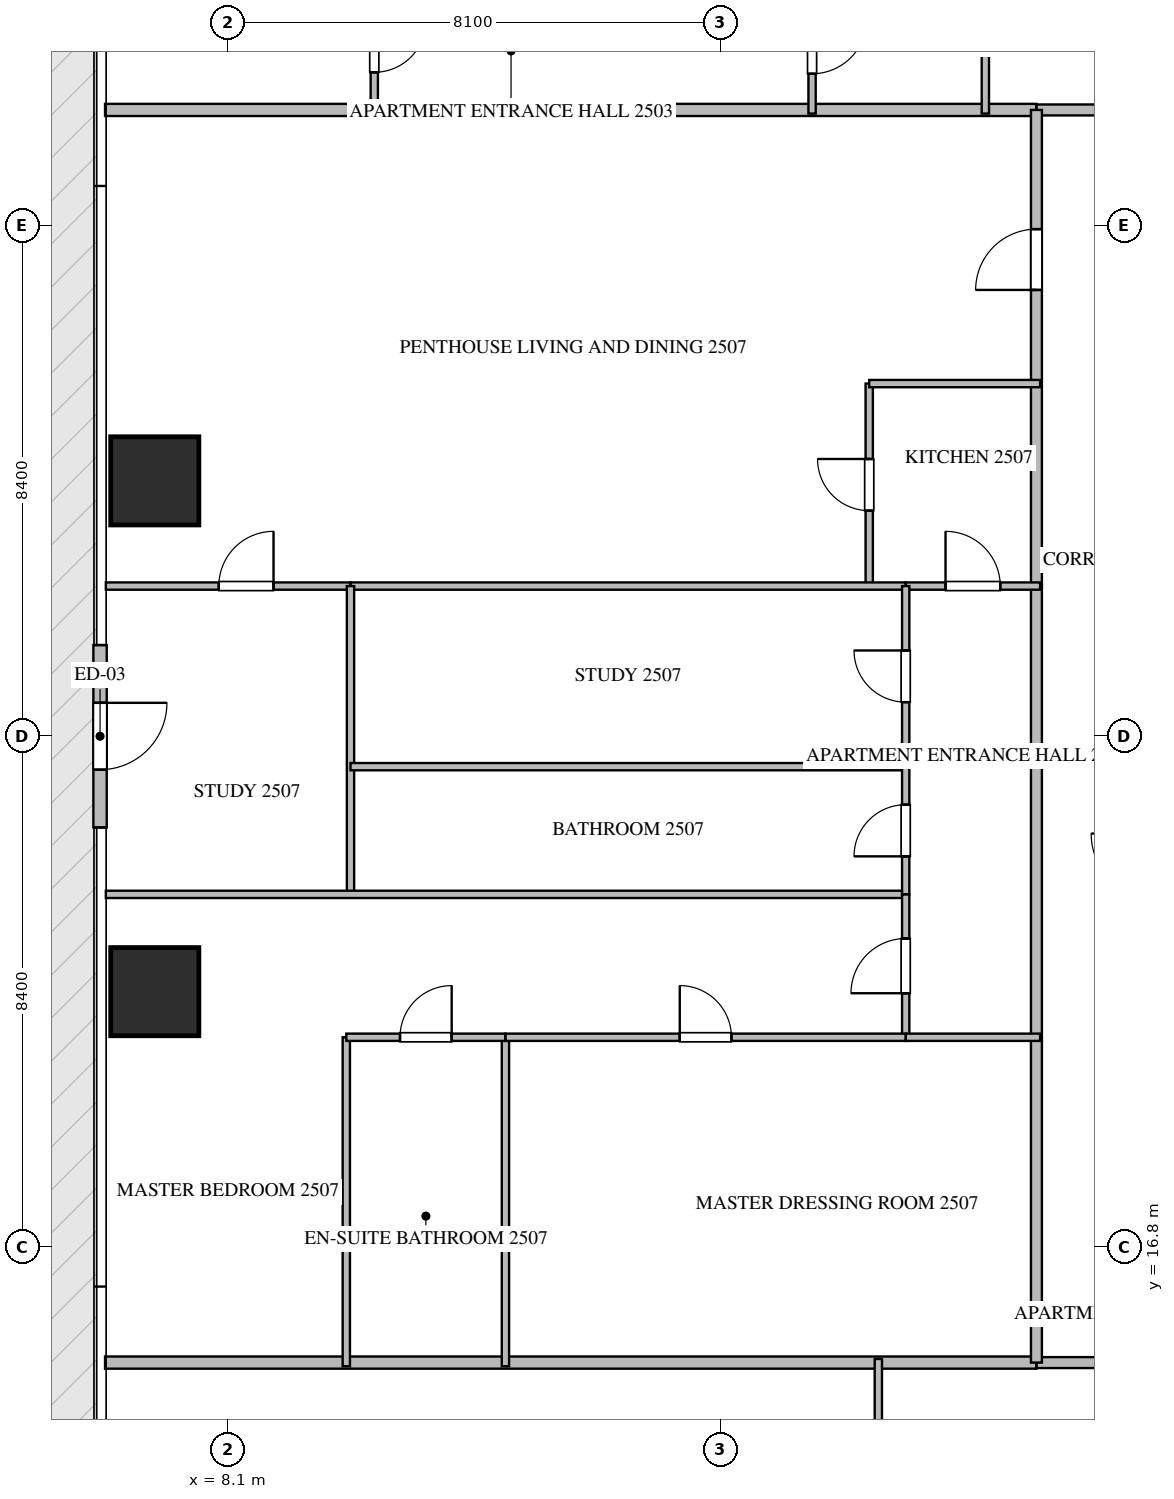
"""IFC4 building model, lengths in metres.
Left out: names, types, materials, properties, quantities, classifications, styles, units other than length and angle.
Written with IfcOpenShell. Run it as: python <this file> out.ifc"""

import sys

from ifc_helpers import new_model, si_unit, direction, frame, frame_2d, origin, origin_2d, place, context, subcontext, project, spatial, rectangle, extrude, source, transform, mapped, element, fill, save


model = new_model("IFC4")
c1 = context("Model", 3, precision=1e-05, world=origin(), true_north=direction((0.0, 1.0)))
c2 = subcontext(c1, "Body", "Model", "MODEL_VIEW")
j1 = project(units=[si_unit("LENGTHUNIT", "METRE"), si_unit("PLANEANGLEUNIT", "RADIAN")], contexts=[c1])
p1 = place(None, origin())
s1 = spatial("IfcSite", under=j1, at=p1, CompositionType="ELEMENT")
p2 = place(p1, origin())
s2 = spatial("IfcBuilding", under=s1, at=p2, CompositionType="ELEMENT")
p3 = place(p2, frame((0.0, 0.0, 101.7)))
s3 = spatial("IfcBuildingStorey", under=s2, at=p3, CompositionType="ELEMENT", Elevation=101.7)
m1 = source(origin(), c2, "Body", "SweptSolid", [
    extrude(rectangle(XDim=1.45, YDim=1.45, at=origin_2d()), origin(), (0.0, 0.0, 1.0), 3.75),
])
for number, where, z_axis, x_axis in (
    (1, (6.9, 21.0, -0.26), (0.0, 0.0, 1.0), (1.0, 0.0, 0.0)),
    (2, (6.9, 29.4, -0.26), (0.0, 0.0, 1.0), (1.0, 0.0, 0.0)),
):
    element("IfcColumn", number, at=place(p3, frame(where, z_axis=z_axis, x_axis=x_axis)), inside=s3, PredefinedType="COLUMN", context=c2, shape_type="MappedRepresentation", body=[
        mapped(m1, transform((0.0, 0.0, 0.0), scale=1.0)),
    ])
p4 = place(p3, frame((6.0, 26.7, 0.0), z_axis=(0.0, 0.0, 1.0), x_axis=(0.0, -1.0, 0.0)))
e3 = element("IfcWall", 3, at=p4, inside=s3, PredefinedType="ELEMENTEDWALL", context=c2, shape_type="SweptSolid", body=[
    extrude(rectangle(XDim=3.0, YDim=0.22, at=frame_2d((1.5, 0.0))), origin(), (0.0, 0.0, 1.0), 3.475),
])
p5 = place(p4, frame((0.95, 0.0, 0.0)))
e4 = element("IfcOpeningElement", 4, at=p5, cuts=e3, PredefinedType="OPENING", context=c2, shape_type="SweptSolid", body=[
    extrude(rectangle(XDim=1.1, YDim=2.2, at=frame_2d((0.55, 1.1))), frame((0.0, 0.12, 0.0), z_axis=(0.0, -1.0, 0.0), x_axis=(1.0, 0.0, 0.0)), (0.0, 0.0, 1.0), 0.24),
])
for number, where, z_axis, x_axis in (
    (5, (6.082, 14.9, 0.0), (0.0, 0.0, 1.0), (1.0, 0.0, 0.0)),
    (6, (6.082, 35.5, 0.0), (0.0, 0.0, 1.0), (1.0, 0.0, 0.0)),
):
    element("IfcWall", number, at=place(p3, frame(where, z_axis=z_axis, x_axis=x_axis)), inside=s3, PredefinedType="PARTITIONING", context=c2, shape_type="SweptSolid", body=[
        extrude(rectangle(XDim=15.318, YDim=0.2, at=frame_2d((7.659, 0.0))), origin(), (0.0, 0.0, 1.0), 3.49),
    ])
p6 = place(p3, frame((21.402, 14.9, 0.0), z_axis=(0.0, 0.0, 1.0), x_axis=(1.0, 0.0, 0.0)))
e7 = element("IfcWall", 7, at=p6, inside=s3, PredefinedType="PARTITIONING", context=c2, shape_type="SweptSolid", body=[
    extrude(rectangle(XDim=21.996, YDim=0.18, at=frame_2d((10.998, 0.0))), origin(), (0.0, 0.0, 1.0), 3.49),
])
p7 = place(p6, frame((10.351, 0.0, 0.0)))
e8 = element("IfcOpeningElement", 8, at=p7, cuts=e7, PredefinedType="OPENING", context=c2, shape_type="SweptSolid", body=[
    extrude(rectangle(XDim=1.0, YDim=2.15, at=frame_2d((0.5, 1.075))), frame((0.0, 0.1, 0.0), z_axis=(0.0, -1.0, 0.0), x_axis=(1.0, 0.0, 0.0)), (0.0, 0.0, 1.0), 0.2),
])
p8 = place(p6, frame((15.978, 0.0, 0.0)))
e9 = element("IfcOpeningElement", 9, at=p8, cuts=e7, PredefinedType="OPENING", context=c2, shape_type="SweptSolid", body=[
    extrude(rectangle(XDim=1.0, YDim=2.15, at=frame_2d((0.5, 1.075))), frame((0.0, 0.1, 0.0), z_axis=(0.0, -1.0, 0.0), x_axis=(1.0, 0.0, 0.0)), (0.0, 0.0, 1.0), 0.2),
])
p9 = place(p3, frame((21.402, 35.5, 0.0), z_axis=(0.0, 0.0, 1.0), x_axis=(1.0, 0.0, 0.0)))
e10 = element("IfcWall", 10, at=p9, inside=s3, PredefinedType="PARTITIONING", context=c2, shape_type="SweptSolid", body=[
    extrude(rectangle(XDim=21.996, YDim=0.18, at=frame_2d((10.998, 0.0))), origin(), (0.0, 0.0, 1.0), 3.49),
])
p10 = place(p9, frame((1.96, 0.0, 0.0)))
e11 = element("IfcOpeningElement", 11, at=p10, cuts=e10, PredefinedType="OPENING", context=c2, shape_type="SweptSolid", body=[
    extrude(rectangle(XDim=1.0, YDim=2.15, at=frame_2d((0.5, 1.075))), frame((0.0, 0.1, 0.0), z_axis=(0.0, -1.0, 0.0), x_axis=(1.0, 0.0, 0.0)), (0.0, 0.0, 1.0), 0.2),
])
p11 = place(p9, frame((5.249, 0.0, 0.0)))
e12 = element("IfcOpeningElement", 12, at=p11, cuts=e10, PredefinedType="OPENING", context=c2, shape_type="SweptSolid", body=[
    extrude(rectangle(XDim=1.0, YDim=2.15, at=frame_2d((0.5, 1.075))), frame((0.0, 0.1, 0.0), z_axis=(0.0, -1.0, 0.0), x_axis=(1.0, 0.0, 0.0)), (0.0, 0.0, 1.0), 0.2),
])
p12 = place(p9, frame((11.653, 0.0, 0.0)))
e13 = element("IfcOpeningElement", 13, at=p12, cuts=e10, PredefinedType="OPENING", context=c2, shape_type="SweptSolid", body=[
    extrude(rectangle(XDim=1.0, YDim=2.15, at=frame_2d((0.5, 1.075))), frame((0.0, 0.1, 0.0), z_axis=(0.0, -1.0, 0.0), x_axis=(1.0, 0.0, 0.0)), (0.0, 0.0, 1.0), 0.2),
])
p13 = place(p9, frame((18.896, 0.0, 0.0)))
e14 = element("IfcOpeningElement", 14, at=p13, cuts=e10, PredefinedType="OPENING", context=c2, shape_type="SweptSolid", body=[
    extrude(rectangle(XDim=1.0, YDim=2.15, at=frame_2d((0.5, 1.075))), frame((0.0, 0.1, 0.0), z_axis=(0.0, -1.0, 0.0), x_axis=(1.0, 0.0, 0.0)), (0.0, 0.0, 1.0), 0.2),
])
p14 = place(p3, frame((21.4, 14.9, 0.0), z_axis=(0.0, 0.0, 1.0), x_axis=(0.0, 1.0, 0.0)))
e15 = element("IfcWall", 15, at=p14, inside=s3, PredefinedType="PARTITIONING", context=c2, shape_type="SweptSolid", body=[
    extrude(rectangle(XDim=20.6, YDim=0.18, at=frame_2d((10.3, 0.0))), origin(), (0.0, 0.0, 1.0), 3.49),
])
p15 = place(p14, frame((17.64, 0.0, 0.0)))
e16 = element("IfcOpeningElement", 16, at=p15, cuts=e15, PredefinedType="OPENING", context=c2, shape_type="SweptSolid", body=[
    extrude(rectangle(XDim=1.0, YDim=2.15, at=frame_2d((0.5, 1.075))), frame((0.0, 0.1, 0.0), z_axis=(0.0, -1.0, 0.0), x_axis=(1.0, 0.0, 0.0)), (0.0, 0.0, 1.0), 0.2),
])
p16 = place(p3, frame((18.8, 12.752, 0.0), z_axis=(0.0, 0.0, 1.0), x_axis=(0.0, 1.0, 0.0)))
e17 = element("IfcWall", 17, at=p16, inside=s3, PredefinedType="PARTITIONING", context=c2, shape_type="SweptSolid", body=[
    extrude(rectangle(XDim=2.208, YDim=0.12, at=frame_2d((1.104, 0.0))), origin(), (0.0, 0.0, 1.0), 3.49),
])
p17 = place(p3, frame((20.56, 38.25, 0.0), z_axis=(0.0, 0.0, 1.0), x_axis=(0.0, -1.0, 0.0)))
e18 = element("IfcWall", 18, at=p17, inside=s3, PredefinedType="PARTITIONING", context=c2, shape_type="SweptSolid", body=[
    extrude(rectangle(XDim=2.81, YDim=0.12, at=frame_2d((1.405, 0.0))), origin(), (0.0, 0.0, 1.0), 3.49),
])
p18 = place(p3, frame((17.71, 37.65, 0.0), z_axis=(0.0, 0.0, 1.0), x_axis=(0.0, -1.0, 0.0)))
e19 = element("IfcWall", 19, at=p18, inside=s3, PredefinedType="PARTITIONING", context=c2, shape_type="SweptSolid", body=[
    extrude(rectangle(XDim=2.21, YDim=0.12, at=frame_2d((1.105, 0.0))), origin(), (0.0, 0.0, 1.0), 3.49),
])
p19 = place(p18, frame((0.655, 0.0, 0.0)))
e20 = element("IfcOpeningElement", 20, at=p19, cuts=e19, PredefinedType="OPENING", context=c2, shape_type="SweptSolid", body=[
    extrude(rectangle(XDim=0.9, YDim=2.1, at=frame_2d((0.45, 1.05))), frame((0.0, 0.07, 0.0), z_axis=(0.0, -1.0, 0.0), x_axis=(1.0, 0.0, 0.0)), (0.0, 0.0, 1.0), 0.14),
])
p20 = place(p3, frame((10.51, 37.648, 0.0), z_axis=(0.0, 0.0, 1.0), x_axis=(0.0, -1.0, 0.0)))
e21 = element("IfcWall", 21, at=p20, inside=s3, PredefinedType="PARTITIONING", context=c2, shape_type="SweptSolid", body=[
    extrude(rectangle(XDim=2.208, YDim=0.12, at=frame_2d((1.104, 0.0))), origin(), (0.0, 0.0, 1.0), 3.49),
])
p21 = place(p20, frame((0.679, 0.0, 0.0)))
e22 = element("IfcOpeningElement", 22, at=p21, cuts=e21, PredefinedType="OPENING", context=c2, shape_type="SweptSolid", body=[
    extrude(rectangle(XDim=0.85, YDim=2.1, at=frame_2d((0.425, 1.05))), frame((0.0, 0.07, 0.0), z_axis=(0.0, -1.0, 0.0), x_axis=(1.0, 0.0, 0.0)), (0.0, 0.0, 1.0), 0.14),
])
p22 = place(p3, frame((18.65, 27.67, 0.0), z_axis=(0.0, 0.0, 1.0), x_axis=(0.0, 1.0, 0.0)))
e23 = element("IfcWall", 23, at=p22, inside=s3, PredefinedType="PARTITIONING", context=c2, shape_type="SweptSolid", body=[
    extrude(rectangle(XDim=3.33, YDim=0.12, at=frame_2d((1.665, 0.0))), origin(), (0.0, 0.0, 1.0), 3.49),
])
p23 = place(p22, frame((1.24, 0.0, 0.0)))
e24 = element("IfcOpeningElement", 24, at=p23, cuts=e23, PredefinedType="OPENING", context=c2, shape_type="SweptSolid", body=[
    extrude(rectangle(XDim=0.85, YDim=2.1, at=frame_2d((0.425, 1.05))), frame((0.0, 0.07, 0.0), z_axis=(0.0, -1.0, 0.0), x_axis=(1.0, 0.0, 0.0)), (0.0, 0.0, 1.0), 0.14),
])
p24 = place(p3, frame((18.65, 31.0, 0.0), z_axis=(0.0, 0.0, 1.0), x_axis=(1.0, 0.0, 0.0)))
e25 = element("IfcWall", 25, at=p24, inside=s3, PredefinedType="PARTITIONING", context=c2, shape_type="SweptSolid", body=[
    extrude(rectangle(XDim=2.81, YDim=0.12, at=frame_2d((1.405, 0.0))), origin(), (0.0, 0.0, 1.0), 3.49),
])
p25 = place(p3, frame((19.25, 27.67, 0.0), z_axis=(0.0, 0.0, 1.0), x_axis=(1.0, 0.0, 0.0)))
e26 = element("IfcWall", 26, at=p25, inside=s3, PredefinedType="PARTITIONING", context=c2, shape_type="SweptSolid", body=[
    extrude(rectangle(XDim=2.21, YDim=0.12, at=frame_2d((1.105, 0.0))), origin(), (0.0, 0.0, 1.0), 3.49),
])
p26 = place(p25, frame((0.655, 0.0, 0.0)))
e27 = element("IfcOpeningElement", 27, at=p26, cuts=e26, PredefinedType="OPENING", context=c2, shape_type="SweptSolid", body=[
    extrude(rectangle(XDim=0.9, YDim=2.1, at=frame_2d((0.45, 1.05))), frame((0.0, 0.07, 0.0), z_axis=(0.0, -1.0, 0.0), x_axis=(1.0, 0.0, 0.0)), (0.0, 0.0, 1.0), 0.14),
])
p27 = place(p3, frame((6.095, 27.67, 0.0), z_axis=(0.0, 0.0, 1.0), x_axis=(1.0, 0.0, 0.0)))
e28 = element("IfcWall", 28, at=p27, inside=s3, PredefinedType="PARTITIONING", context=c2, shape_type="SweptSolid", body=[
    extrude(rectangle(XDim=4.024, YDim=0.12, at=frame_2d((2.012, 0.0))), origin(), (0.0, 0.0, 1.0), 3.49),
])
p28 = place(p27, frame((1.858, 0.0, 0.0)))
e29 = element("IfcOpeningElement", 29, at=p28, cuts=e28, PredefinedType="OPENING", context=c2, shape_type="SweptSolid", body=[
    extrude(rectangle(XDim=0.9, YDim=2.1, at=frame_2d((0.45, 1.05))), frame((0.0, 0.07, 0.0), z_axis=(0.0, -1.0, 0.0), x_axis=(1.0, 0.0, 0.0)), (0.0, 0.0, 1.0), 0.14),
])
p29 = place(p3, frame((10.121, 27.67, 0.0), z_axis=(0.0, 0.0, 1.0), x_axis=(1.0, 0.0, 0.0)))
e30 = element("IfcWall", 30, at=p29, inside=s3, PredefinedType="PARTITIONING", context=c2, shape_type="SweptSolid", body=[
    extrude(rectangle(XDim=9.127, YDim=0.12, at=frame_2d((4.563, 0.0))), origin(), (0.0, 0.0, 1.0), 3.49),
])
p30 = place(p3, frame((10.119, 22.6, 0.0), z_axis=(0.0, 0.0, 1.0), x_axis=(0.0, 1.0, 0.0)))
e31 = element("IfcWall", 31, at=p30, inside=s3, PredefinedType="PARTITIONING", context=c2, shape_type="SweptSolid", body=[
    extrude(rectangle(XDim=5.07, YDim=0.12, at=frame_2d((2.535, 0.0))), origin(), (0.0, 0.0, 1.0), 3.49),
])
p31 = place(p3, frame((6.095, 22.6, 0.0), z_axis=(0.0, 0.0, 1.0), x_axis=(1.0, 0.0, 0.0)))
e32 = element("IfcWall", 32, at=p31, inside=s3, PredefinedType="PARTITIONING", context=c2, shape_type="SweptSolid", body=[
    extrude(rectangle(XDim=13.155, YDim=0.12, at=frame_2d((6.578, 0.0))), origin(), (0.0, 0.0, 1.0), 3.49),
])
p32 = place(p3, frame((10.119, 24.7, 0.0), z_axis=(0.0, 0.0, 1.0), x_axis=(1.0, 0.0, 0.0)))
e33 = element("IfcWall", 33, at=p32, inside=s3, PredefinedType="PARTITIONING", context=c2, shape_type="SweptSolid", body=[
    extrude(rectangle(XDim=9.131, YDim=0.12, at=frame_2d((4.565, 0.0))), origin(), (0.0, 0.0, 1.0), 3.49),
])
p33 = place(p3, frame((19.25, 22.6, 0.0), z_axis=(0.0, 0.0, 1.0), x_axis=(0.0, 1.0, 0.0)))
e34 = element("IfcWall", 34, at=p33, inside=s3, PredefinedType="PARTITIONING", context=c2, shape_type="SweptSolid", body=[
    extrude(rectangle(XDim=2.1, YDim=0.12, at=frame_2d((1.05, 0.0))), origin(), (0.0, 0.0, 1.0), 3.49),
])
p34 = place(p33, frame((0.625, 0.0, 0.0)))
e35 = element("IfcOpeningElement", 35, at=p34, cuts=e34, PredefinedType="OPENING", context=c2, shape_type="SweptSolid", body=[
    extrude(rectangle(XDim=0.85, YDim=2.1, at=frame_2d((0.425, 1.05))), frame((0.0, 0.07, 0.0), z_axis=(0.0, -1.0, 0.0), x_axis=(1.0, 0.0, 0.0)), (0.0, 0.0, 1.0), 0.14),
])
p35 = place(p3, frame((19.25, 24.702, 0.0), z_axis=(0.0, 0.0, 1.0), x_axis=(0.0, 1.0, 0.0)))
e36 = element("IfcWall", 36, at=p35, inside=s3, PredefinedType="PARTITIONING", context=c2, shape_type="SweptSolid", body=[
    extrude(rectangle(XDim=2.968, YDim=0.12, at=frame_2d((1.484, 0.0))), origin(), (0.0, 0.0, 1.0), 3.49),
])
p36 = place(p35, frame((1.059, 0.0, 0.0)))
e37 = element("IfcOpeningElement", 37, at=p36, cuts=e36, PredefinedType="OPENING", context=c2, shape_type="SweptSolid", body=[
    extrude(rectangle(XDim=0.85, YDim=2.1, at=frame_2d((0.425, 1.05))), frame((0.0, 0.07, 0.0), z_axis=(0.0, -1.0, 0.0), x_axis=(1.0, 0.0, 0.0)), (0.0, 0.0, 1.0), 0.14),
])
p37 = place(p3, frame((19.25, 20.25, 0.0), z_axis=(0.0, 0.0, 1.0), x_axis=(0.0, 1.0, 0.0)))
e38 = element("IfcWall", 38, at=p37, inside=s3, PredefinedType="PARTITIONING", context=c2, shape_type="SweptSolid", body=[
    extrude(rectangle(XDim=2.348, YDim=0.12, at=frame_2d((1.174, 0.0))), origin(), (0.0, 0.0, 1.0), 3.49),
])
p38 = place(p37, frame((0.724, 0.0, 0.0)))
e39 = element("IfcOpeningElement", 39, at=p38, cuts=e38, PredefinedType="OPENING", context=c2, shape_type="SweptSolid", body=[
    extrude(rectangle(XDim=0.9, YDim=2.1, at=frame_2d((0.45, 1.05))), frame((0.0, 0.07, 0.0), z_axis=(0.0, -1.0, 0.0), x_axis=(1.0, 0.0, 0.0)), (0.0, 0.0, 1.0), 0.14),
])
for number, where, z_axis, x_axis in (
    (40, (10.05, 14.84, 0.0), (0.0, 0.0, 1.0), (0.0, 1.0, 0.0)),
    (41, (12.667, 14.84, 0.0), (0.0, 0.0, 1.0), (0.0, 1.0, 0.0)),
):
    element("IfcWall", number, at=place(p3, frame(where, z_axis=z_axis, x_axis=x_axis)), inside=s3, PredefinedType="PARTITIONING", context=c2, shape_type="SweptSolid", body=[
        extrude(rectangle(XDim=5.41, YDim=0.12, at=frame_2d((2.705, 0.0))), origin(), (0.0, 0.0, 1.0), 3.49),
    ])
p39 = place(p3, frame((10.05, 20.25, 0.0), z_axis=(0.0, 0.0, 1.0), x_axis=(1.0, 0.0, 0.0)))
e42 = element("IfcWall", 42, at=p39, inside=s3, PredefinedType="PARTITIONING", context=c2, shape_type="SweptSolid", body=[
    extrude(rectangle(XDim=2.617, YDim=0.12, at=frame_2d((1.309, 0.0))), origin(), (0.0, 0.0, 1.0), 3.49),
])
p40 = place(p39, frame((0.883, 0.0, 0.0)))
e43 = element("IfcOpeningElement", 43, at=p40, cuts=e42, PredefinedType="OPENING", context=c2, shape_type="SweptSolid", body=[
    extrude(rectangle(XDim=0.85, YDim=2.1, at=frame_2d((0.425, 1.05))), frame((0.0, 0.07, 0.0), z_axis=(0.0, -1.0, 0.0), x_axis=(1.0, 0.0, 0.0)), (0.0, 0.0, 1.0), 0.14),
])
p41 = place(p3, frame((12.669, 20.25, 0.0), z_axis=(0.0, 0.0, 1.0), x_axis=(1.0, 0.0, 0.0)))
e44 = element("IfcWall", 44, at=p41, inside=s3, PredefinedType="PARTITIONING", context=c2, shape_type="SweptSolid", body=[
    extrude(rectangle(XDim=6.581, YDim=0.12, at=frame_2d((3.291, 0.0))), origin(), (0.0, 0.0, 1.0), 3.49),
])
p42 = place(p41, frame((2.865, 0.0, 0.0)))
e45 = element("IfcOpeningElement", 45, at=p42, cuts=e44, PredefinedType="OPENING", context=c2, shape_type="SweptSolid", body=[
    extrude(rectangle(XDim=0.85, YDim=2.1, at=frame_2d((0.425, 1.05))), frame((0.0, 0.07, 0.0), z_axis=(0.0, -1.0, 0.0), x_axis=(1.0, 0.0, 0.0)), (0.0, 0.0, 1.0), 0.14),
])
p43 = place(p3, frame((19.252, 20.25, 0.0), z_axis=(0.0, 0.0, 1.0), x_axis=(1.0, 0.0, 0.0)))
e46 = element("IfcWall", 46, at=p43, inside=s3, PredefinedType="PARTITIONING", context=c2, shape_type="SweptSolid", body=[
    extrude(rectangle(XDim=2.208, YDim=0.12, at=frame_2d((1.104, 0.0))), origin(), (0.0, 0.0, 1.0), 3.49),
])
m2 = source(origin(), c2, "Body", "SweptSolid", [
    extrude(rectangle(XDim=1.1, YDim=2.2, at=frame_2d((0.55, 1.1))), frame((0.0, 0.025, 0.0), z_axis=(0.0, -1.0, 0.0), x_axis=(1.0, 0.0, 0.0)), (0.0, 0.0, 1.0), 0.05),
])
p44 = place(p5, origin())
e47 = element("IfcDoor", 47, at=p44, inside=s3, OperationType="SINGLE_SWING_LEFT", PredefinedType="DOOR", context=c2, shape_type="MappedRepresentation", body=[
    mapped(m2, transform((0.0, 0.0, 0.0), scale=1.0)),
])
fill(e4, e47)
m3 = source(origin(), c2, "Body", "SweptSolid", [
    extrude(rectangle(XDim=1.0, YDim=2.15, at=frame_2d((0.5, 1.075))), frame((0.0, 0.025, 0.0), z_axis=(0.0, -1.0, 0.0), x_axis=(1.0, 0.0, 0.0)), (0.0, 0.0, 1.0), 0.05),
])
p45 = place(p15, origin())
e48 = element("IfcDoor", 48, at=p45, inside=s3, OperationType="SINGLE_SWING_LEFT", PredefinedType="DOOR", context=c2, shape_type="MappedRepresentation", body=[
    mapped(m3, transform((0.0, 0.0, 0.0), scale=1.0)),
])
fill(e16, e48)
m4 = source(origin(), c2, "Body", "SweptSolid", [
    extrude(rectangle(XDim=0.9, YDim=2.1, at=frame_2d((0.45, 1.05))), frame((0.0, 0.025, 0.0), z_axis=(0.0, -1.0, 0.0), x_axis=(1.0, 0.0, 0.0)), (0.0, 0.0, 1.0), 0.05),
])
p46 = place(p19, origin())
e49 = element("IfcDoor", 49, at=p46, inside=s3, OperationType="SINGLE_SWING_LEFT", PredefinedType="DOOR", context=c2, shape_type="MappedRepresentation", body=[
    mapped(m4, transform((0.0, 0.0, 0.0), scale=1.0)),
])
fill(e20, e49)
m5 = source(origin(), c2, "Body", "SweptSolid", [
    extrude(rectangle(XDim=0.85, YDim=2.1, at=frame_2d((0.425, 1.05))), frame((0.0, 0.025, 0.0), z_axis=(0.0, -1.0, 0.0), x_axis=(1.0, 0.0, 0.0)), (0.0, 0.0, 1.0), 0.05),
])
p47 = place(p21, origin())
e50 = element("IfcDoor", 50, at=p47, inside=s3, OperationType="SINGLE_SWING_LEFT", PredefinedType="DOOR", context=c2, shape_type="MappedRepresentation", body=[
    mapped(m5, transform((0.0, 0.0, 0.0), scale=1.0)),
])
fill(e22, e50)
p48 = place(p23, origin())
e51 = element("IfcDoor", 51, at=p48, inside=s3, OperationType="SINGLE_SWING_RIGHT", PredefinedType="DOOR", context=c2, shape_type="MappedRepresentation", body=[
    mapped(m5, transform((0.0, 0.0, 0.0), scale=1.0)),
])
fill(e24, e51)
p49 = place(p26, origin())
e52 = element("IfcDoor", 52, at=p49, inside=s3, OperationType="SINGLE_SWING_LEFT", PredefinedType="DOOR", context=c2, shape_type="MappedRepresentation", body=[
    mapped(m4, transform((0.0, 0.0, 0.0), scale=1.0)),
])
fill(e27, e52)
p50 = place(p28, origin())
e53 = element("IfcDoor", 53, at=p50, inside=s3, OperationType="SINGLE_SWING_RIGHT", PredefinedType="DOOR", context=c2, shape_type="MappedRepresentation", body=[
    mapped(m4, transform((0.0, 0.0, 0.0), scale=1.0)),
])
fill(e29, e53)
p51 = place(p34, origin())
e54 = element("IfcDoor", 54, at=p51, inside=s3, OperationType="SINGLE_SWING_LEFT", PredefinedType="DOOR", context=c2, shape_type="MappedRepresentation", body=[
    mapped(m5, transform((0.0, 0.0, 0.0), scale=1.0)),
])
fill(e35, e54)
p52 = place(p36, origin())
e55 = element("IfcDoor", 55, at=p52, inside=s3, OperationType="SINGLE_SWING_RIGHT", PredefinedType="DOOR", context=c2, shape_type="MappedRepresentation", body=[
    mapped(m5, transform((0.0, 0.0, 0.0), scale=1.0)),
])
fill(e37, e55)
p53 = place(p38, origin())
e56 = element("IfcDoor", 56, at=p53, inside=s3, OperationType="SINGLE_SWING_LEFT", PredefinedType="DOOR", context=c2, shape_type="MappedRepresentation", body=[
    mapped(m4, transform((0.0, 0.0, 0.0), scale=1.0)),
])
fill(e39, e56)
p54 = place(p40, origin())
e57 = element("IfcDoor", 57, at=p54, inside=s3, OperationType="SINGLE_SWING_RIGHT", PredefinedType="DOOR", context=c2, shape_type="MappedRepresentation", body=[
    mapped(m5, transform((0.0, 0.0, 0.0), scale=1.0)),
])
fill(e43, e57)
p55 = place(p42, origin())
e58 = element("IfcDoor", 58, at=p55, inside=s3, OperationType="SINGLE_SWING_LEFT", PredefinedType="DOOR", context=c2, shape_type="MappedRepresentation", body=[
    mapped(m5, transform((0.0, 0.0, 0.0), scale=1.0)),
])
fill(e45, e58)
save(model, sys.argv[1])
